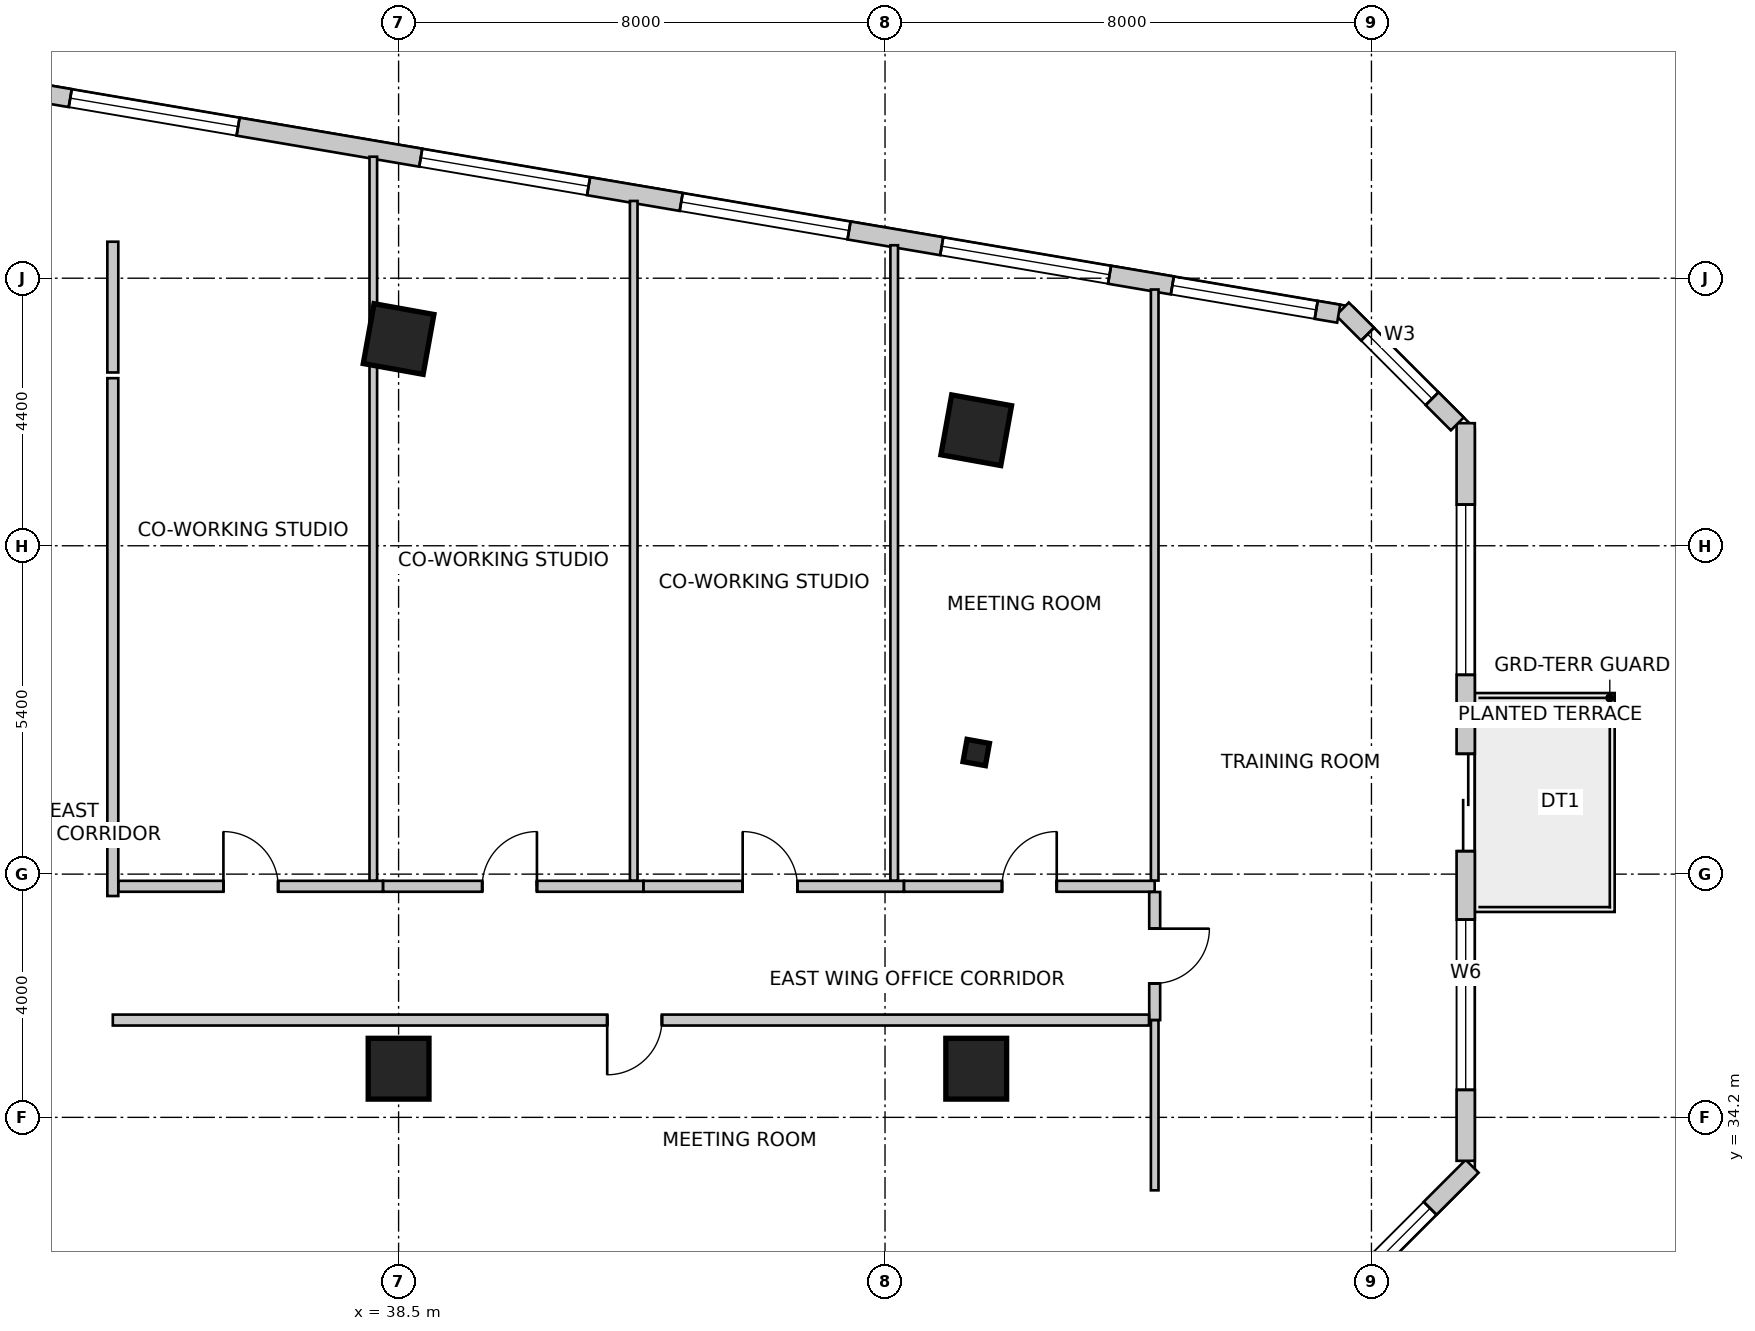
"""IFC4 building model, lengths in metres.
Left out: names, types, materials, properties, quantities, classifications, styles, units other than length and angle.
Written with IfcOpenShell. Run it as: python <this file> out.ifc"""

import sys

from ifc_helpers import new_model, si_unit, direction, frame, frame_2d, origin, origin_2d, place, context, subcontext, project, spatial, rectangle, i_section, extrude, source, transform, mapped, element, fill, save


model = new_model("IFC4")
c1 = context("Model", 3, precision=1e-05, world=origin(), true_north=direction((0.0, 1.0)))
c2 = subcontext(c1, "Body", "Model", "MODEL_VIEW")
j1 = project(units=[si_unit("LENGTHUNIT", "METRE"), si_unit("PLANEANGLEUNIT", "RADIAN")], contexts=[c1])
p1 = place(None, origin())
s1 = spatial("IfcSite", under=j1, at=p1, CompositionType="ELEMENT")
p2 = place(p1, origin())
s2 = spatial("IfcBuilding", under=s1, at=p2, CompositionType="ELEMENT")
p3 = place(p2, frame((0.0, 0.0, 83.0)))
s3 = spatial("IfcBuildingStorey", under=s2, at=p3, CompositionType="ELEMENT", Elevation=83.0)
m1 = source(origin(), c2, "Body", "SweptSolid", [
    extrude(rectangle(XDim=1.0, YDim=1.0, at=origin_2d()), origin(), (0.0, 0.0, 1.0), 4.0),
])
for number, where, z_axis, x_axis in (
    (1, (38.5, 47.0, 0.0), (0.0, 0.0, 1.0), (0.984, -0.177, 0.0)),
    (2, (48.0, 45.5, 0.0), (0.0, 0.0, 1.0), (0.984, -0.177, 0.0)),
    (3, (38.5, 35.0, 0.0), (0.0, 0.0, 1.0), (1.0, 0.0, 0.0)),
    (4, (48.0, 35.0, 0.0), (0.0, 0.0, 1.0), (1.0, 0.0, 0.0)),
):
    element("IfcColumn", number, at=place(p3, frame(where, z_axis=z_axis, x_axis=x_axis)), inside=s3, PredefinedType="COLUMN", context=c2, shape_type="MappedRepresentation", body=[
        mapped(m1, transform((0.0, 0.0, 0.0), scale=1.0)),
    ])
m2 = source(origin(), c2, "Body", "SweptSolid", [
    extrude(i_section(OverallWidth=0.374, OverallDepth=0.372, WebThickness=0.016, FlangeThickness=0.026, FilletRadius=0.015, at=origin_2d()), origin(), (0.0, 0.0, 1.0), 4.0),
])
p4 = place(p3, frame((48.0, 40.2, 0.0), z_axis=(0.0, 0.0, 1.0), x_axis=(0.984195607969, -0.17708474032, 0.0)))
e5 = element("IfcColumn", 5, at=p4, inside=s3, PredefinedType="COLUMN", context=c2, shape_type="MappedRepresentation", body=[
    mapped(m2, transform((0.0, 0.0, 0.0), scale=1.0)),
])
p5 = place(p3, frame((53.076, 30.316, 0.0), z_axis=(0.0, 0.0, 1.0), x_axis=(0.707078757535, 0.707134803727, 0.0)))
e6 = element("IfcWall", 6, at=p5, inside=s3, PredefinedType="SOLIDWALL", context=c2, shape_type="SweptSolid", body=[
    extrude(rectangle(XDim=4.356, YDim=0.3, at=frame_2d((2.178, 0.0))), origin(), (0.0, 0.0, 1.0), 3.75),
])
m3 = source(origin(), c2, "Body", "SweptSolid", [
    extrude(rectangle(XDim=2.4, YDim=2.2, at=frame_2d((1.2, 1.1))), frame((0.0, 0.16, 0.0), z_axis=(0.0, -1.0, 0.0), x_axis=(1.0, 0.0, 0.0)), (0.0, 0.0, 1.0), 0.32),
])
p6 = place(p5, frame((0.978, 0.0, 0.85)))
e7 = element("IfcOpeningElement", 7, at=p6, cuts=e6, PredefinedType="OPENING", context=c2, shape_type="MappedRepresentation", body=[
    mapped(m3, transform((0.0, 0.0, 0.0), scale=1.0)),
])
p7 = place(p3, frame((56.05, 33.485, 0.0), z_axis=(0.0, 0.0, 1.0), x_axis=(0.0, 1.0, 0.0)))
e8 = element("IfcWall", 8, at=p7, inside=s3, PredefinedType="SOLIDWALL", context=c2, shape_type="SweptSolid", body=[
    extrude(rectangle(XDim=12.131, YDim=0.3, at=frame_2d((6.065, 0.0))), origin(), (0.0, 0.0, 1.0), 3.75),
])
m4 = source(origin(), c2, "Body", "SweptSolid", [
    extrude(rectangle(XDim=1.6, YDim=2.15, at=frame_2d((0.8, 1.075))), frame((0.0, 0.16, 0.0), z_axis=(0.0, -1.0, 0.0), x_axis=(1.0, 0.0, 0.0)), (0.0, 0.0, 1.0), 0.32),
])
p8 = place(p7, frame((5.093, 0.0, 0.0)))
e9 = element("IfcOpeningElement", 9, at=p8, cuts=e8, PredefinedType="OPENING", context=c2, shape_type="MappedRepresentation", body=[
    mapped(m4, transform((0.0, 0.0, 0.0), scale=1.0)),
])
m5 = source(origin(), c2, "Body", "SweptSolid", [
    extrude(rectangle(XDim=2.8, YDim=2.4, at=frame_2d((1.4, 1.2))), frame((0.0, 0.16, 0.0), z_axis=(0.0, -1.0, 0.0), x_axis=(1.0, 0.0, 0.0)), (0.0, 0.0, 1.0), 0.32),
])
p9 = place(p7, frame((1.167, 0.0, 0.85)))
e10 = element("IfcOpeningElement", 10, at=p9, cuts=e8, PredefinedType="OPENING", context=c2, shape_type="MappedRepresentation", body=[
    mapped(m5, transform((0.0, 0.0, 0.0), scale=1.0)),
])
p10 = place(p7, frame((7.992, 0.0, 0.85)))
e11 = element("IfcOpeningElement", 11, at=p10, cuts=e8, PredefinedType="OPENING", context=c2, shape_type="MappedRepresentation", body=[
    mapped(m5, transform((0.0, 0.0, 0.0), scale=1.0)),
])
p11 = place(p3, frame((55.912, 45.604, 0.0), z_axis=(0.0, 0.0, 1.0), x_axis=(-0.707152443695, 0.707061115729, 0.0)))
e12 = element("IfcWall", 12, at=p11, inside=s3, PredefinedType="SOLIDWALL", context=c2, shape_type="SweptSolid", body=[
    extrude(rectangle(XDim=2.673, YDim=0.3, at=frame_2d((1.337, 0.0))), origin(), (0.0, 0.0, 1.0), 3.75),
])
m6 = source(origin(), c2, "Body", "SweptSolid", [
    extrude(rectangle(XDim=1.5, YDim=1.8, at=frame_2d((0.75, 0.9))), frame((0.0, 0.16, 0.0), z_axis=(0.0, -1.0, 0.0), x_axis=(1.0, 0.0, 0.0)), (0.0, 0.0, 1.0), 0.32),
])
p12 = place(p11, frame((0.587, 0.0, 0.85)))
e13 = element("IfcOpeningElement", 13, at=p12, cuts=e12, PredefinedType="OPENING", context=c2, shape_type="MappedRepresentation", body=[
    mapped(m6, transform((0.0, 0.0, 0.0), scale=1.0)),
])
p13 = place(p3, frame((53.961, 47.417, 0.0), z_axis=(0.0, 0.0, 1.0), x_axis=(-0.985865713455, 0.167537443678, 0.0)))
e14 = element("IfcWall", 14, at=p13, inside=s3, PredefinedType="SOLIDWALL", context=c2, shape_type="SweptSolid", body=[
    extrude(rectangle(XDim=32.537, YDim=0.3, at=frame_2d((16.269, 0.0))), origin(), (0.0, 0.0, 1.0), 3.75),
])
p14 = place(p13, frame((0.375, 0.0, 0.85)))
e15 = element("IfcOpeningElement", 15, at=p14, cuts=e14, PredefinedType="OPENING", context=c2, shape_type="MappedRepresentation", body=[
    mapped(m3, transform((0.0, 0.0, 0.0), scale=1.0)),
])
p15 = place(p13, frame((3.822, 0.0, 0.85)))
e16 = element("IfcOpeningElement", 16, at=p15, cuts=e14, PredefinedType="OPENING", context=c2, shape_type="MappedRepresentation", body=[
    mapped(m5, transform((0.0, 0.0, 0.0), scale=1.0)),
])
p16 = place(p13, frame((8.168, 0.0, 0.85)))
e17 = element("IfcOpeningElement", 17, at=p16, cuts=e14, PredefinedType="OPENING", context=c2, shape_type="MappedRepresentation", body=[
    mapped(m5, transform((0.0, 0.0, 0.0), scale=1.0)),
])
p17 = place(p13, frame((12.513, 0.0, 0.85)))
e18 = element("IfcOpeningElement", 18, at=p17, cuts=e14, PredefinedType="OPENING", context=c2, shape_type="MappedRepresentation", body=[
    mapped(m5, transform((0.0, 0.0, 0.0), scale=1.0)),
])
p18 = place(p13, frame((18.36, 0.0, 0.85)))
e19 = element("IfcOpeningElement", 19, at=p18, cuts=e14, PredefinedType="OPENING", context=c2, shape_type="MappedRepresentation", body=[
    mapped(m5, transform((0.0, 0.0, 0.0), scale=1.0)),
])
p19 = place(p13, frame((24.895, 0.0, 0.85)))
e20 = element("IfcOpeningElement", 20, at=p19, cuts=e14, PredefinedType="OPENING", context=c2, shape_type="MappedRepresentation", body=[
    mapped(m5, transform((0.0, 0.0, 0.0), scale=1.0)),
])
p20 = place(p13, frame((29.395, 0.0, 0.85)))
e21 = element("IfcOpeningElement", 21, at=p20, cuts=e14, PredefinedType="OPENING", context=c2, shape_type="MappedRepresentation", body=[
    mapped(m5, transform((0.0, 0.0, 0.0), scale=1.0)),
])
p21 = place(p3, frame((33.8, 48.6, 0.0), z_axis=(0.0, 0.0, 1.0), x_axis=(0.0, -1.0, 0.0)))
e22 = element("IfcWall", 22, at=p21, inside=s3, PredefinedType="PARTITIONING", context=c2, shape_type="SweptSolid", body=[
    extrude(rectangle(XDim=2.15, YDim=0.18, at=frame_2d((1.075, 0.0))), origin(), (0.0, 0.0, 1.0), 2.892),
])
p22 = place(p3, frame((33.8, 46.356, 0.0), z_axis=(0.0, 0.0, 1.0), x_axis=(0.0, -1.0, 0.0)))
e23 = element("IfcWall", 23, at=p22, inside=s3, PredefinedType="PARTITIONING", context=c2, shape_type="SweptSolid", body=[
    extrude(rectangle(XDim=8.516, YDim=0.18, at=frame_2d((4.258, 0.0))), origin(), (0.0, 0.0, 1.0), 3.322),
])
p23 = place(p3, frame((33.894, 38.0, 0.0), z_axis=(0.0, 0.0, 1.0), x_axis=(1.0, 0.0, 0.0)))
e24 = element("IfcWall", 24, at=p23, inside=s3, PredefinedType="PARTITIONING", context=c2, shape_type="SweptSolid", body=[
    extrude(rectangle(XDim=4.35, YDim=0.18, at=frame_2d((2.175, 0.0))), origin(), (0.0, 0.0, 1.0), 3.434),
])
m7 = source(origin(), c2, "Body", "SweptSolid", [
    extrude(rectangle(XDim=0.9, YDim=2.15, at=frame_2d((0.45, 1.075))), frame((0.0, 0.1, 0.0), z_axis=(0.0, -1.0, 0.0), x_axis=(1.0, 0.0, 0.0)), (0.0, 0.0, 1.0), 0.2),
])
p24 = place(p23, frame((1.725, 0.0, 0.0)))
e25 = element("IfcOpeningElement", 25, at=p24, cuts=e24, PredefinedType="OPENING", context=c2, shape_type="MappedRepresentation", body=[
    mapped(m7, transform((0.0, 0.0, 0.0), scale=1.0)),
])
p25 = place(p3, frame((38.246, 38.0, 0.0), z_axis=(0.0, 0.0, 1.0), x_axis=(1.0, 0.0, 0.0)))
e26 = element("IfcWall", 26, at=p25, inside=s3, PredefinedType="PARTITIONING", context=c2, shape_type="SweptSolid", body=[
    extrude(rectangle(XDim=4.281, YDim=0.18, at=frame_2d((2.141, 0.0))), origin(), (0.0, 0.0, 1.0), 3.125),
])
p26 = place(p25, frame((1.629, 0.0, 0.0)))
e27 = element("IfcOpeningElement", 27, at=p26, cuts=e26, PredefinedType="OPENING", context=c2, shape_type="MappedRepresentation", body=[
    mapped(m7, transform((0.0, 0.0, 0.0), scale=1.0)),
])
p27 = place(p3, frame((42.529, 38.0, 0.0), z_axis=(0.0, 0.0, 1.0), x_axis=(1.0, 0.0, 0.0)))
e28 = element("IfcWall", 28, at=p27, inside=s3, PredefinedType="PARTITIONING", context=c2, shape_type="SweptSolid", body=[
    extrude(rectangle(XDim=4.282, YDim=0.18, at=frame_2d((2.141, 0.0))), origin(), (0.0, 0.0, 1.0), 3.322),
])
p28 = place(p27, frame((1.63, 0.0, 0.0)))
e29 = element("IfcOpeningElement", 29, at=p28, cuts=e28, PredefinedType="OPENING", context=c2, shape_type="MappedRepresentation", body=[
    mapped(m7, transform((0.0, 0.0, 0.0), scale=1.0)),
])
p29 = place(p3, frame((46.813, 38.0, 0.0), z_axis=(0.0, 0.0, 1.0), x_axis=(1.0, 0.0, 0.0)))
e30 = element("IfcWall", 30, at=p29, inside=s3, PredefinedType="PARTITIONING", context=c2, shape_type="SweptSolid", body=[
    extrude(rectangle(XDim=4.122, YDim=0.18, at=frame_2d((2.061, 0.0))), origin(), (0.0, 0.0, 1.0), 3.125),
])
p30 = place(p29, frame((1.611, 0.0, 0.0)))
e31 = element("IfcOpeningElement", 31, at=p30, cuts=e30, PredefinedType="OPENING", context=c2, shape_type="MappedRepresentation", body=[
    mapped(m7, transform((0.0, 0.0, 0.0), scale=1.0)),
])
p31 = place(p3, frame((50.935, 37.906, 0.0), z_axis=(0.0, 0.0, 1.0), x_axis=(0.0, -1.0, 0.0)))
e32 = element("IfcWall", 32, at=p31, inside=s3, PredefinedType="PARTITIONING", context=c2, shape_type="SweptSolid", body=[
    extrude(rectangle(XDim=2.106, YDim=0.18, at=frame_2d((1.053, 0.0))), origin(), (0.0, 0.0, 1.0), 3.75),
])
p32 = place(p31, frame((0.603, 0.0, 0.0)))
e33 = element("IfcOpeningElement", 33, at=p32, cuts=e32, PredefinedType="OPENING", context=c2, shape_type="MappedRepresentation", body=[
    mapped(m7, transform((0.0, 0.0, 0.0), scale=1.0)),
])
p33 = place(p3, frame((50.841, 35.8, 0.0), z_axis=(0.0, 0.0, 1.0), x_axis=(-1.0, 0.0, 0.0)))
e34 = element("IfcWall", 34, at=p33, inside=s3, PredefinedType="PARTITIONING", context=c2, shape_type="SweptSolid", body=[
    extrude(rectangle(XDim=17.041, YDim=0.18, at=frame_2d((8.521, 0.0))), origin(), (0.0, 0.0, 1.0), 3.125),
])
p34 = place(p33, frame((8.01, 0.0, 0.0)))
e35 = element("IfcOpeningElement", 35, at=p34, cuts=e34, PredefinedType="OPENING", context=c2, shape_type="MappedRepresentation", body=[
    mapped(m7, transform((0.0, 0.0, 0.0), scale=1.0)),
])
p35 = place(p3, frame((38.084, 49.998, 0.0), z_axis=(0.0, 0.0, 1.0), x_axis=(0.0, -1.0, 0.0)))
e36 = element("IfcWall", 36, at=p35, inside=s3, PredefinedType="PARTITIONING", context=c2, shape_type="SweptSolid", body=[
    extrude(rectangle(XDim=11.904, YDim=0.125, at=frame_2d((5.952, 0.0))), origin(), (0.0, 0.0, 1.0), 2.892),
])
p36 = place(p3, frame((42.367, 49.27, 0.0), z_axis=(0.0, 0.0, 1.0), x_axis=(0.0, -1.0, 0.0)))
e37 = element("IfcWall", 37, at=p36, inside=s3, PredefinedType="PARTITIONING", context=c2, shape_type="SweptSolid", body=[
    extrude(rectangle(XDim=11.176, YDim=0.125, at=frame_2d((5.588, 0.0))), origin(), (0.0, 0.0, 1.0), 2.892),
])
p37 = place(p3, frame((46.651, 48.542, 0.0), z_axis=(0.0, 0.0, 1.0), x_axis=(0.0, -1.0, 0.0)))
e38 = element("IfcWall", 38, at=p37, inside=s3, PredefinedType="PARTITIONING", context=c2, shape_type="SweptSolid", body=[
    extrude(rectangle(XDim=10.448, YDim=0.125, at=frame_2d((5.224, 0.0))), origin(), (0.0, 0.0, 1.0), 2.892),
])
p38 = place(p3, frame((50.935, 47.814, 0.0), z_axis=(0.0, 0.0, 1.0), x_axis=(0.0, -1.0, 0.0)))
e39 = element("IfcWall", 39, at=p38, inside=s3, PredefinedType="PARTITIONING", context=c2, shape_type="SweptSolid", body=[
    extrude(rectangle(XDim=9.72, YDim=0.125, at=frame_2d((4.86, 0.0))), origin(), (0.0, 0.0, 1.0), 3.75),
])
p39 = place(p3, frame((50.935, 33.0, 0.0), z_axis=(0.0, 0.0, 1.0), x_axis=(0.0, 1.0, 0.0)))
e40 = element("IfcWall", 40, at=p39, inside=s3, PredefinedType="PARTITIONING", context=c2, shape_type="SweptSolid", body=[
    extrude(rectangle(XDim=2.798, YDim=0.125, at=frame_2d((1.399, 0.0))), origin(), (0.0, 0.0, 1.0), 3.75),
])
m8 = source(origin(), c2, "Body", "SweptSolid", [
    extrude(rectangle(XDim=2.4, YDim=2.2, at=frame_2d((1.2, 1.1))), frame((0.0, -0.015, 0.0), z_axis=(0.0, -1.0, 0.0), x_axis=(1.0, 0.0, 0.0)), (0.0, 0.0, 1.0), 0.06),
])
p40 = place(p6, origin())
e41 = element("IfcWindow", 41, at=p40, inside=s3, PartitioningType="SINGLE_PANEL", PredefinedType="WINDOW", context=c2, shape_type="MappedRepresentation", body=[
    mapped(m8, transform((0.0, 0.0, 0.0), scale=1.0)),
])
fill(e7, e41)
m9 = source(origin(), c2, "Body", "SweptSolid", [
    extrude(rectangle(XDim=1.6, YDim=2.15, at=frame_2d((0.8, 1.075))), frame((0.0, 0.025, 0.0), z_axis=(0.0, -1.0, 0.0), x_axis=(1.0, 0.0, 0.0)), (0.0, 0.0, 1.0), 0.05),
])
p41 = place(p8, origin())
e42 = element("IfcDoor", 42, at=p41, inside=s3, OperationType="DOUBLE_DOOR_SLIDING", PredefinedType="DOOR", context=c2, shape_type="MappedRepresentation", body=[
    mapped(m9, transform((0.0, 0.0, 0.0), scale=1.0)),
])
fill(e9, e42)
m10 = source(origin(), c2, "Body", "SweptSolid", [
    extrude(rectangle(XDim=2.8, YDim=2.4, at=frame_2d((1.4, 1.2))), frame((0.0, -0.015, 0.0), z_axis=(0.0, -1.0, 0.0), x_axis=(1.0, 0.0, 0.0)), (0.0, 0.0, 1.0), 0.06),
])
p42 = place(p9, origin())
e43 = element("IfcWindow", 43, at=p42, inside=s3, PartitioningType="SINGLE_PANEL", PredefinedType="WINDOW", context=c2, shape_type="MappedRepresentation", body=[
    mapped(m10, transform((0.0, 0.0, 0.0), scale=1.0)),
])
fill(e10, e43)
p43 = place(p10, origin())
e44 = element("IfcWindow", 44, at=p43, inside=s3, PartitioningType="SINGLE_PANEL", PredefinedType="WINDOW", context=c2, shape_type="MappedRepresentation", body=[
    mapped(m10, transform((0.0, 0.0, 0.0), scale=1.0)),
])
fill(e11, e44)
m11 = source(origin(), c2, "Body", "SweptSolid", [
    extrude(rectangle(XDim=1.5, YDim=1.8, at=frame_2d((0.75, 0.9))), frame((0.0, -0.015, 0.0), z_axis=(0.0, -1.0, 0.0), x_axis=(1.0, 0.0, 0.0)), (0.0, 0.0, 1.0), 0.06),
])
p44 = place(p12, origin())
e45 = element("IfcWindow", 45, at=p44, inside=s3, PartitioningType="SINGLE_PANEL", PredefinedType="WINDOW", context=c2, shape_type="MappedRepresentation", body=[
    mapped(m11, transform((0.0, 0.0, 0.0), scale=1.0)),
])
fill(e13, e45)
p45 = place(p14, origin())
e46 = element("IfcWindow", 46, at=p45, inside=s3, PartitioningType="SINGLE_PANEL", PredefinedType="WINDOW", context=c2, shape_type="MappedRepresentation", body=[
    mapped(m8, transform((0.0, 0.0, 0.0), scale=1.0)),
])
fill(e15, e46)
p46 = place(p15, origin())
e47 = element("IfcWindow", 47, at=p46, inside=s3, PartitioningType="SINGLE_PANEL", PredefinedType="WINDOW", context=c2, shape_type="MappedRepresentation", body=[
    mapped(m10, transform((0.0, 0.0, 0.0), scale=1.0)),
])
fill(e16, e47)
p47 = place(p16, origin())
e48 = element("IfcWindow", 48, at=p47, inside=s3, PartitioningType="SINGLE_PANEL", PredefinedType="WINDOW", context=c2, shape_type="MappedRepresentation", body=[
    mapped(m10, transform((0.0, 0.0, 0.0), scale=1.0)),
])
fill(e17, e48)
p48 = place(p17, origin())
e49 = element("IfcWindow", 49, at=p48, inside=s3, PartitioningType="SINGLE_PANEL", PredefinedType="WINDOW", context=c2, shape_type="MappedRepresentation", body=[
    mapped(m10, transform((0.0, 0.0, 0.0), scale=1.0)),
])
fill(e18, e49)
p49 = place(p18, origin())
e50 = element("IfcWindow", 50, at=p49, inside=s3, PartitioningType="SINGLE_PANEL", PredefinedType="WINDOW", context=c2, shape_type="MappedRepresentation", body=[
    mapped(m10, transform((0.0, 0.0, 0.0), scale=1.0)),
])
fill(e19, e50)
m12 = source(origin(), c2, "Body", "SweptSolid", [
    extrude(rectangle(XDim=0.9, YDim=2.15, at=frame_2d((0.45, 1.075))), frame((0.0, 0.025, 0.0), z_axis=(0.0, -1.0, 0.0), x_axis=(1.0, 0.0, 0.0)), (0.0, 0.0, 1.0), 0.05),
])
p50 = place(p24, origin())
e51 = element("IfcDoor", 51, at=p50, inside=s3, OperationType="SINGLE_SWING_LEFT", PredefinedType="DOOR", context=c2, shape_type="MappedRepresentation", body=[
    mapped(m12, transform((0.0, 0.0, 0.0), scale=1.0)),
])
fill(e25, e51)
p51 = place(p26, origin())
e52 = element("IfcDoor", 52, at=p51, inside=s3, OperationType="SINGLE_SWING_RIGHT", PredefinedType="DOOR", context=c2, shape_type="MappedRepresentation", body=[
    mapped(m12, transform((0.0, 0.0, 0.0), scale=1.0)),
])
fill(e27, e52)
p52 = place(p28, origin())
e53 = element("IfcDoor", 53, at=p52, inside=s3, OperationType="SINGLE_SWING_LEFT", PredefinedType="DOOR", context=c2, shape_type="MappedRepresentation", body=[
    mapped(m12, transform((0.0, 0.0, 0.0), scale=1.0)),
])
fill(e29, e53)
p53 = place(p30, origin())
e54 = element("IfcDoor", 54, at=p53, inside=s3, OperationType="SINGLE_SWING_RIGHT", PredefinedType="DOOR", context=c2, shape_type="MappedRepresentation", body=[
    mapped(m12, transform((0.0, 0.0, 0.0), scale=1.0)),
])
fill(e31, e54)
p54 = place(p32, origin())
e55 = element("IfcDoor", 55, at=p54, inside=s3, OperationType="SINGLE_SWING_LEFT", PredefinedType="DOOR", context=c2, shape_type="MappedRepresentation", body=[
    mapped(m12, transform((0.0, 0.0, 0.0), scale=1.0)),
])
fill(e33, e55)
p55 = place(p34, origin())
e56 = element("IfcDoor", 56, at=p55, inside=s3, OperationType="SINGLE_SWING_RIGHT", PredefinedType="DOOR", context=c2, shape_type="MappedRepresentation", body=[
    mapped(m12, transform((0.0, 0.0, 0.0), scale=1.0)),
])
fill(e35, e56)
save(model, sys.argv[1])
